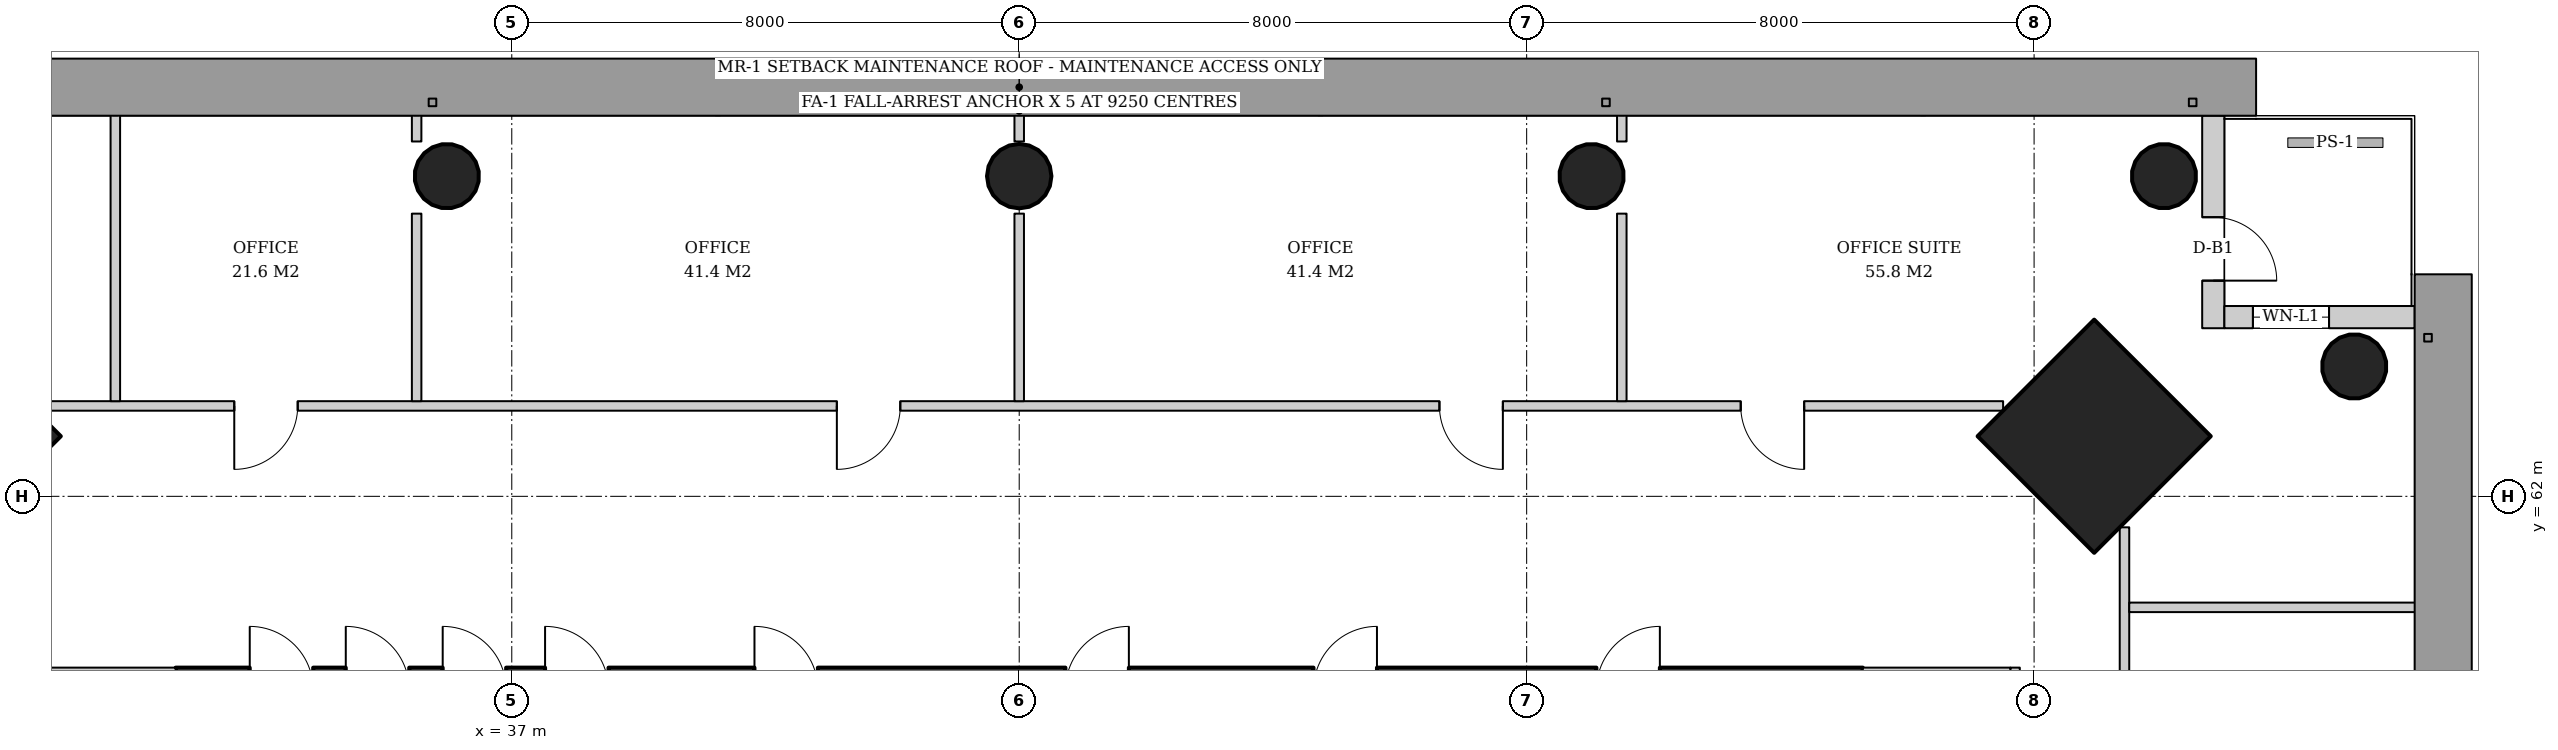
"""IFC4 building model, lengths in metres.
Left out: names, types, materials, properties, quantities, classifications, styles, units other than length and angle.
Written with IfcOpenShell. Run it as: python <this file> out.ifc"""

import sys

from ifc_helpers import new_model, si_unit, direction, frame, frame_2d, origin, origin_2d, place, context, subcontext, project, spatial, rectangle, hollow_circle, extrude, element, fill, save


model = new_model("IFC4")
c1 = context("Model", 3, precision=1e-05, world=origin(), true_north=direction((0.0, 1.0)))
c2 = subcontext(c1, "Body", "Model", "MODEL_VIEW")
j1 = project(units=[si_unit("LENGTHUNIT", "METRE"), si_unit("PLANEANGLEUNIT", "RADIAN")], contexts=[c1])
p1 = place(None, origin())
s1 = spatial("IfcSite", under=j1, at=p1, CompositionType="ELEMENT")
p2 = place(p1, origin())
s2 = spatial("IfcBuilding", under=s1, at=p2, CompositionType="ELEMENT")
p3 = place(p2, frame((0.0, 0.0, 112.2)))
s3 = spatial("IfcBuildingStorey", under=s2, at=p3, CompositionType="ELEMENT", Elevation=112.2)
p4 = place(p3, frame((61.986, 62.986, 0.0), z_axis=(-0.031898107953, -0.031898107953, 0.998981992539), x_axis=(0.707106781187, -0.707106781187, 0.0)))
e1 = element("IfcColumn", 1, at=p4, inside=s3, PredefinedType="COLUMN", context=c2, shape_type="SweptSolid", body=[
    extrude(rectangle(XDim=2.6, YDim=2.6, at=origin_2d()), origin(), (0.0, 0.0, 1.0), 3.804),
])
p5 = place(p3, frame((66.086, 64.086, 0.0), z_axis=(-0.031898107953, -0.031898107953, 0.998981992539), x_axis=(0.707106781187, -0.707106781187, 0.0)))
e2 = element("IfcColumn", 2, at=p5, inside=s3, PredefinedType="COLUMN", context=c2, shape_type="SweptSolid", body=[
    extrude(hollow_circle(Radius=0.508, WallThickness=0.04, at=origin_2d()), origin(), (0.0, 0.0, 1.0), 3.804),
])
p6 = place(p3, frame((28.014, 62.986, 0.0), z_axis=(0.031898107953, -0.031898107953, 0.998981992539), x_axis=(0.707106781187, 0.707106781187, 0.0)))
e3 = element("IfcColumn", 3, at=p6, inside=s3, PredefinedType="COLUMN", context=c2, shape_type="SweptSolid", body=[
    extrude(rectangle(XDim=2.6, YDim=2.6, at=origin_2d()), origin(), (0.0, 0.0, 1.0), 3.804),
])
p7 = place(p3, frame((63.086, 67.086, 0.0), z_axis=(-0.031898107953, -0.031898107953, 0.998981992539), x_axis=(0.707106781187, -0.707106781187, 0.0)))
e4 = element("IfcColumn", 4, at=p7, inside=s3, PredefinedType="COLUMN", context=c2, shape_type="SweptSolid", body=[
    extrude(hollow_circle(Radius=0.508, WallThickness=0.04, at=origin_2d()), origin(), (0.0, 0.0, 1.0), 3.804),
])
p8 = place(p3, frame((54.043, 67.086, 0.0), z_axis=(-0.015987237665, -0.031910269556, 0.999362868496), x_axis=(0.894067115991, -0.447933021895, 0.0)))
e5 = element("IfcColumn", 5, at=p8, inside=s3, PredefinedType="COLUMN", context=c2, shape_type="SweptSolid", body=[
    extrude(hollow_circle(Radius=0.508, WallThickness=0.04, at=origin_2d()), origin(), (0.0, 0.0, 1.0), 3.802),
])
p9 = place(p3, frame((45.0, 67.086, 0.0), z_axis=(0.0, -0.031914348339, 0.999490607445), x_axis=(1.0, 0.0, 0.0)))
e6 = element("IfcColumn", 6, at=p9, inside=s3, PredefinedType="COLUMN", context=c2, shape_type="SweptSolid", body=[
    extrude(hollow_circle(Radius=0.508, WallThickness=0.04, at=origin_2d()), origin(), (0.0, 0.0, 1.0), 3.802),
])
p10 = place(p3, frame((35.957, 67.086, 0.0), z_axis=(0.015987237665, -0.031910269556, 0.999362868496), x_axis=(0.894067115991, 0.447933021895, 0.0)))
e7 = element("IfcColumn", 7, at=p10, inside=s3, PredefinedType="COLUMN", context=c2, shape_type="SweptSolid", body=[
    extrude(hollow_circle(Radius=0.508, WallThickness=0.04, at=origin_2d()), origin(), (0.0, 0.0, 1.0), 3.802),
])
p11 = place(p3, frame((31.7, 58.95, 0.0), z_axis=(0.0, 0.0, 1.0), x_axis=(1.0, 0.0, 0.0)))
e8 = element("IfcWall", 8, at=p11, inside=s3, PredefinedType="SHEAR", context=c2, shape_type="SweptSolid", body=[
    extrude(rectangle(XDim=26.6, YDim=0.7, at=frame_2d((13.3, 0.0))), origin(), (0.0, 0.0, 1.0), 3.8),
])
p12 = place(p11, frame((17.94, 0.0, 0.0)))
e9 = element("IfcOpeningElement", 9, at=p12, cuts=e8, PredefinedType="OPENING", context=c2, shape_type="SweptSolid", body=[
    extrude(rectangle(XDim=1.0, YDim=2.1, at=frame_2d((0.5, 1.05))), frame((0.0, 0.36, 0.0), z_axis=(0.0, -1.0, 0.0), x_axis=(1.0, 0.0, 0.0)), (0.0, 0.0, 1.0), 0.72),
])
p13 = place(p11, frame((5.825, 0.0, 0.0)))
e10 = element("IfcOpeningElement", 10, at=p13, cuts=e8, PredefinedType="OPENING", context=c2, shape_type="SweptSolid", body=[
    extrude(rectangle(XDim=1.0, YDim=2.1, at=frame_2d((0.5, 1.05))), frame((0.0, 0.36, 0.0), z_axis=(0.0, -1.0, 0.0), x_axis=(1.0, 0.0, 0.0)), (0.0, 0.0, 1.0), 0.72),
])
p14 = place(p11, frame((1.169, 0.0, 0.0)))
e11 = element("IfcOpeningElement", 11, at=p14, cuts=e8, PredefinedType="OPENING", context=c2, shape_type="SweptSolid", body=[
    extrude(rectangle(XDim=1.0, YDim=2.1, at=frame_2d((0.5, 1.05))), frame((0.0, 0.36, 0.0), z_axis=(0.0, -1.0, 0.0), x_axis=(1.0, 0.0, 0.0)), (0.0, 0.0, 1.0), 0.72),
])
p15 = place(p11, frame((2.683, 0.0, 0.0)))
e12 = element("IfcOpeningElement", 12, at=p15, cuts=e8, PredefinedType="OPENING", context=c2, shape_type="SweptSolid", body=[
    extrude(rectangle(XDim=1.0, YDim=2.1, at=frame_2d((0.5, 1.05))), frame((0.0, 0.36, 0.0), z_axis=(0.0, -1.0, 0.0), x_axis=(1.0, 0.0, 0.0)), (0.0, 0.0, 1.0), 0.72),
])
p16 = place(p11, frame((4.211, 0.0, 0.0)))
e13 = element("IfcOpeningElement", 13, at=p16, cuts=e8, PredefinedType="OPENING", context=c2, shape_type="SweptSolid", body=[
    extrude(rectangle(XDim=1.0, YDim=2.1, at=frame_2d((0.5, 1.05))), frame((0.0, 0.36, 0.0), z_axis=(0.0, -1.0, 0.0), x_axis=(1.0, 0.0, 0.0)), (0.0, 0.0, 1.0), 0.72),
])
p17 = place(p11, frame((9.126, 0.0, 0.0)))
e14 = element("IfcOpeningElement", 14, at=p17, cuts=e8, PredefinedType="OPENING", context=c2, shape_type="SweptSolid", body=[
    extrude(rectangle(XDim=1.0, YDim=2.1, at=frame_2d((0.5, 1.05))), frame((0.0, 0.36, 0.0), z_axis=(0.0, -1.0, 0.0), x_axis=(1.0, 0.0, 0.0)), (0.0, 0.0, 1.0), 0.72),
])
p18 = place(p11, frame((14.029, 0.0, 0.0)))
e15 = element("IfcOpeningElement", 15, at=p18, cuts=e8, PredefinedType="OPENING", context=c2, shape_type="SweptSolid", body=[
    extrude(rectangle(XDim=1.0, YDim=2.1, at=frame_2d((0.5, 1.05))), frame((0.0, 0.36, 0.0), z_axis=(0.0, -1.0, 0.0), x_axis=(1.0, 0.0, 0.0)), (0.0, 0.0, 1.0), 0.72),
])
p19 = place(p11, frame((22.4, 0.0, 0.0)))
e16 = element("IfcOpeningElement", 16, at=p19, cuts=e8, PredefinedType="OPENING", context=c2, shape_type="SweptSolid", body=[
    extrude(rectangle(XDim=1.0, YDim=2.1, at=frame_2d((0.5, 1.05))), frame((0.0, 0.36, 0.0), z_axis=(0.0, -1.0, 0.0), x_axis=(1.0, 0.0, 0.0)), (0.0, 0.0, 1.0), 0.72),
])
p20 = place(p3, frame((63.825, 68.0, 0.0), z_axis=(0.0, 0.0, 1.0), x_axis=(0.0, -1.0, 0.0)))
e17 = element("IfcWall", 17, at=p20, inside=s3, PredefinedType="SOLIDWALL", context=c2, shape_type="SweptSolid", body=[
    extrude(rectangle(XDim=3.35, YDim=0.35, at=frame_2d((1.675, 0.0))), origin(), (0.0, 0.0, 1.0), 3.62),
])
p21 = place(p20, frame((1.6, 0.0, 0.0)))
e18 = element("IfcOpeningElement", 18, at=p21, cuts=e17, PredefinedType="OPENING", context=c2, shape_type="SweptSolid", body=[
    extrude(rectangle(XDim=1.0, YDim=2.4, at=frame_2d((0.5, 1.2))), frame((0.0, 0.185, 0.0), z_axis=(0.0, -1.0, 0.0), x_axis=(1.0, 0.0, 0.0)), (0.0, 0.0, 1.0), 0.37),
])
p22 = place(p3, frame((64.0, 64.825, 0.0), z_axis=(0.0, 0.0, 1.0), x_axis=(1.0, 0.0, 0.0)))
e19 = element("IfcWall", 19, at=p22, inside=s3, PredefinedType="SOLIDWALL", context=c2, shape_type="SweptSolid", body=[
    extrude(rectangle(XDim=3.0, YDim=0.35, at=frame_2d((1.5, 0.0))), origin(), (0.0, 0.0, 1.0), 3.62),
])
p23 = place(p22, frame((0.45, 0.0, 0.6)))
e20 = element("IfcOpeningElement", 20, at=p23, cuts=e19, PredefinedType="OPENING", context=c2, shape_type="SweptSolid", body=[
    extrude(rectangle(XDim=1.2, YDim=2.55, at=frame_2d((0.6, 1.275))), frame((0.0, 0.185, 0.0), z_axis=(0.0, -1.0, 0.0), x_axis=(1.0, 0.0, 0.0)), (0.0, 0.0, 1.0), 0.37),
])
p24 = place(p3, frame((60.7, 48.025, 0.0), z_axis=(0.0, 0.0, 1.0), x_axis=(0.0, 1.0, 0.0)))
e21 = element("IfcWall", 21, at=p24, inside=s3, PredefinedType="PARTITIONING", context=c2, shape_type="SweptSolid", body=[
    extrude(rectangle(XDim=11.275, YDim=0.15, at=frame_2d((5.638, 0.0))), origin(), (0.0, 0.0, 1.0), 2.806),
])
p25 = place(p24, frame((5.137, 0.0, 0.0)))
e22 = element("IfcOpeningElement", 22, at=p25, cuts=e21, PredefinedType="OPENING", context=c2, shape_type="SweptSolid", body=[
    extrude(rectangle(XDim=1.0, YDim=2.1, at=frame_2d((0.5, 1.05))), frame((0.0, 0.085, 0.0), z_axis=(0.0, -1.0, 0.0), x_axis=(1.0, 0.0, 0.0)), (0.0, 0.0, 1.0), 0.17),
])
for number, where, z_axis, x_axis in (
    (23, (58.3, 59.225, 0.0), (0.0, 0.0, 1.0), (1.0, 0.0, 0.0)),
    (24, (31.7, 59.225, 0.0), (0.0, 0.0, 1.0), (-1.0, 0.0, 0.0)),
):
    element("IfcWall", number, at=place(p3, frame(where, z_axis=z_axis, x_axis=x_axis)), inside=s3, PredefinedType="PARTITIONING", context=c2, shape_type="SweptSolid", body=[
        extrude(rectangle(XDim=2.325, YDim=0.15, at=frame_2d((1.163, 0.0))), origin(), (0.0, 0.0, 1.0), 3.62),
    ])
p26 = place(p3, frame((62.425, 30.489, 0.0), z_axis=(0.0, 0.0, 1.0), x_axis=(0.0, 1.0, 0.0)))
e25 = element("IfcWall", 25, at=p26, inside=s3, PredefinedType="PARTITIONING", context=c2, shape_type="SweptSolid", body=[
    extrude(rectangle(XDim=31.023, YDim=0.15, at=frame_2d((15.511, 0.0))), origin(), (0.0, 0.0, 1.0), 2.72),
])
p27 = place(p26, frame((3.136, 0.0, 0.0)))
e26 = element("IfcOpeningElement", 26, at=p27, cuts=e25, PredefinedType="OPENING", context=c2, shape_type="SweptSolid", body=[
    extrude(rectangle(XDim=1.0, YDim=2.1, at=frame_2d((0.5, 1.05))), frame((0.0, 0.085, 0.0), z_axis=(0.0, -1.0, 0.0), x_axis=(1.0, 0.0, 0.0)), (0.0, 0.0, 1.0), 0.17),
])
p28 = place(p26, frame((7.886, 0.0, 0.0)))
e27 = element("IfcOpeningElement", 27, at=p28, cuts=e25, PredefinedType="OPENING", context=c2, shape_type="SweptSolid", body=[
    extrude(rectangle(XDim=1.0, YDim=2.1, at=frame_2d((0.5, 1.05))), frame((0.0, 0.085, 0.0), z_axis=(0.0, -1.0, 0.0), x_axis=(1.0, 0.0, 0.0)), (0.0, 0.0, 1.0), 0.17),
])
p29 = place(p26, frame((12.636, 0.0, 0.0)))
e28 = element("IfcOpeningElement", 28, at=p29, cuts=e25, PredefinedType="OPENING", context=c2, shape_type="SweptSolid", body=[
    extrude(rectangle(XDim=1.0, YDim=2.1, at=frame_2d((0.5, 1.05))), frame((0.0, 0.085, 0.0), z_axis=(0.0, -1.0, 0.0), x_axis=(1.0, 0.0, 0.0)), (0.0, 0.0, 1.0), 0.17),
])
p30 = place(p26, frame((17.386, 0.0, 0.0)))
e29 = element("IfcOpeningElement", 29, at=p30, cuts=e25, PredefinedType="OPENING", context=c2, shape_type="SweptSolid", body=[
    extrude(rectangle(XDim=1.0, YDim=2.1, at=frame_2d((0.5, 1.05))), frame((0.0, 0.085, 0.0), z_axis=(0.0, -1.0, 0.0), x_axis=(1.0, 0.0, 0.0)), (0.0, 0.0, 1.0), 0.17),
])
p31 = place(p26, frame((22.136, 0.0, 0.0)))
e30 = element("IfcOpeningElement", 30, at=p31, cuts=e25, PredefinedType="OPENING", context=c2, shape_type="SweptSolid", body=[
    extrude(rectangle(XDim=1.0, YDim=2.1, at=frame_2d((0.5, 1.05))), frame((0.0, 0.085, 0.0), z_axis=(0.0, -1.0, 0.0), x_axis=(1.0, 0.0, 0.0)), (0.0, 0.0, 1.0), 0.17),
])
p32 = place(p3, frame((62.5, 60.25, 0.0), z_axis=(0.0, 0.0, 1.0), x_axis=(1.0, 0.0, 0.0)))
e31 = element("IfcWall", 31, at=p32, inside=s3, PredefinedType="PARTITIONING", context=c2, shape_type="SweptSolid", body=[
    extrude(rectangle(XDim=4.54, YDim=0.15, at=frame_2d((2.27, 0.0))), origin(), (0.0, 0.0, 1.0), 2.82),
])
p33 = place(p3, frame((60.511, 63.425, 0.0), z_axis=(0.0, 0.0, 1.0), x_axis=(-1.0, 0.0, 0.0)))
e32 = element("IfcWall", 32, at=p33, inside=s3, PredefinedType="PARTITIONING", context=c2, shape_type="SweptSolid", body=[
    extrude(rectangle(XDim=31.023, YDim=0.15, at=frame_2d((15.511, 0.0))), origin(), (0.0, 0.0, 1.0), 2.72),
])
p34 = place(p33, frame((3.136, 0.0, 0.0)))
e33 = element("IfcOpeningElement", 33, at=p34, cuts=e32, PredefinedType="OPENING", context=c2, shape_type="SweptSolid", body=[
    extrude(rectangle(XDim=1.0, YDim=2.1, at=frame_2d((0.5, 1.05))), frame((0.0, 0.085, 0.0), z_axis=(0.0, -1.0, 0.0), x_axis=(1.0, 0.0, 0.0)), (0.0, 0.0, 1.0), 0.17),
])
p35 = place(p33, frame((7.886, 0.0, 0.0)))
e34 = element("IfcOpeningElement", 34, at=p35, cuts=e32, PredefinedType="OPENING", context=c2, shape_type="SweptSolid", body=[
    extrude(rectangle(XDim=1.0, YDim=2.1, at=frame_2d((0.5, 1.05))), frame((0.0, 0.085, 0.0), z_axis=(0.0, -1.0, 0.0), x_axis=(1.0, 0.0, 0.0)), (0.0, 0.0, 1.0), 0.17),
])
p36 = place(p33, frame((17.386, 0.0, 0.0)))
e35 = element("IfcOpeningElement", 35, at=p36, cuts=e32, PredefinedType="OPENING", context=c2, shape_type="SweptSolid", body=[
    extrude(rectangle(XDim=1.0, YDim=2.1, at=frame_2d((0.5, 1.05))), frame((0.0, 0.085, 0.0), z_axis=(0.0, -1.0, 0.0), x_axis=(1.0, 0.0, 0.0)), (0.0, 0.0, 1.0), 0.17),
])
p37 = place(p33, frame((26.886, 0.0, 0.0)))
e36 = element("IfcOpeningElement", 36, at=p37, cuts=e32, PredefinedType="OPENING", context=c2, shape_type="SweptSolid", body=[
    extrude(rectangle(XDim=1.0, YDim=2.1, at=frame_2d((0.5, 1.05))), frame((0.0, 0.085, 0.0), z_axis=(0.0, -1.0, 0.0), x_axis=(1.0, 0.0, 0.0)), (0.0, 0.0, 1.0), 0.17),
])
p38 = place(p3, frame((54.5, 63.5, 0.0), z_axis=(0.0, 0.0, 1.0), x_axis=(0.0, 1.0, 0.0)))
e37 = element("IfcWall", 37, at=p38, inside=s3, PredefinedType="PARTITIONING", context=c2, shape_type="SweptSolid", body=[
    extrude(rectangle(XDim=2.956, YDim=0.15, at=frame_2d((1.478, 0.0))), origin(), (0.0, 0.0, 1.0), 3.62),
])
p39 = place(p3, frame((54.5, 67.594, 0.0), z_axis=(0.0, 0.0, 1.0), x_axis=(0.0, 1.0, 0.0)))
e38 = element("IfcWall", 38, at=p39, inside=s3, PredefinedType="PARTITIONING", context=c2, shape_type="SweptSolid", body=[
    extrude(rectangle(XDim=0.446, YDim=0.15, at=frame_2d((0.223, 0.0))), origin(), (0.0, 0.0, 1.0), 3.62),
])
p40 = place(p3, frame((45.0, 63.5, 0.0), z_axis=(0.0, 0.0, 1.0), x_axis=(0.0, 1.0, 0.0)))
e39 = element("IfcWall", 39, at=p40, inside=s3, PredefinedType="PARTITIONING", context=c2, shape_type="SweptSolid", body=[
    extrude(rectangle(XDim=2.956, YDim=0.15, at=frame_2d((1.478, 0.0))), origin(), (0.0, 0.0, 1.0), 3.62),
])
p41 = place(p3, frame((45.0, 67.594, 0.0), z_axis=(0.0, 0.0, 1.0), x_axis=(0.0, 1.0, 0.0)))
e40 = element("IfcWall", 40, at=p41, inside=s3, PredefinedType="PARTITIONING", context=c2, shape_type="SweptSolid", body=[
    extrude(rectangle(XDim=0.446, YDim=0.15, at=frame_2d((0.223, 0.0))), origin(), (0.0, 0.0, 1.0), 3.62),
])
p42 = place(p3, frame((35.5, 63.5, 0.0), z_axis=(0.0, 0.0, 1.0), x_axis=(0.0, 1.0, 0.0)))
e41 = element("IfcWall", 41, at=p42, inside=s3, PredefinedType="PARTITIONING", context=c2, shape_type="SweptSolid", body=[
    extrude(rectangle(XDim=2.956, YDim=0.15, at=frame_2d((1.478, 0.0))), origin(), (0.0, 0.0, 1.0), 3.62),
])
p43 = place(p3, frame((35.5, 67.594, 0.0), z_axis=(0.0, 0.0, 1.0), x_axis=(0.0, 1.0, 0.0)))
e42 = element("IfcWall", 42, at=p43, inside=s3, PredefinedType="PARTITIONING", context=c2, shape_type="SweptSolid", body=[
    extrude(rectangle(XDim=0.446, YDim=0.15, at=frame_2d((0.223, 0.0))), origin(), (0.0, 0.0, 1.0), 3.62),
])
p44 = place(p3, frame((30.75, 63.5, 0.0), z_axis=(0.0, 0.0, 1.0), x_axis=(0.0, 1.0, 0.0)))
e43 = element("IfcWall", 43, at=p44, inside=s3, PredefinedType="PARTITIONING", context=c2, shape_type="SweptSolid", body=[
    extrude(rectangle(XDim=4.54, YDim=0.15, at=frame_2d((2.27, 0.0))), origin(), (0.0, 0.0, 1.0), 2.82),
])
p45 = place(p21, origin())
e44 = element("IfcDoor", 44, at=p45, inside=s3, OperationType="SINGLE_SWING_RIGHT", PredefinedType="DOOR", context=c2, shape_type="SweptSolid", body=[
    extrude(rectangle(XDim=1.0, YDim=2.4, at=frame_2d((0.5, 1.2))), frame((0.0, 0.025, 0.0), z_axis=(0.0, -1.0, 0.0), x_axis=(1.0, 0.0, 0.0)), (0.0, 0.0, 1.0), 0.05),
])
fill(e18, e44)
p46 = place(p23, origin())
e45 = element("IfcWindow", 45, at=p46, inside=s3, PartitioningType="SINGLE_PANEL", PredefinedType="WINDOW", context=c2, shape_type="SweptSolid", body=[
    extrude(rectangle(XDim=1.2, YDim=2.55, at=frame_2d((0.6, 1.275))), frame((0.0, 0.03, 0.0), z_axis=(0.0, -1.0, 0.0), x_axis=(1.0, 0.0, 0.0)), (0.0, 0.0, 1.0), 0.06),
])
fill(e20, e45)
p47 = place(p34, origin())
e46 = element("IfcDoor", 46, at=p47, inside=s3, OperationType="SINGLE_SWING_LEFT", PredefinedType="DOOR", context=c2, shape_type="SweptSolid", body=[
    extrude(rectangle(XDim=1.0, YDim=2.1, at=frame_2d((0.5, 1.05))), frame((0.0, 0.025, 0.0), z_axis=(0.0, -1.0, 0.0), x_axis=(1.0, 0.0, 0.0)), (0.0, 0.0, 1.0), 0.05),
])
fill(e33, e46)
p48 = place(p35, origin())
e47 = element("IfcDoor", 47, at=p48, inside=s3, OperationType="SINGLE_SWING_LEFT", PredefinedType="DOOR", context=c2, shape_type="SweptSolid", body=[
    extrude(rectangle(XDim=1.0, YDim=2.1, at=frame_2d((0.5, 1.05))), frame((0.0, 0.025, 0.0), z_axis=(0.0, -1.0, 0.0), x_axis=(1.0, 0.0, 0.0)), (0.0, 0.0, 1.0), 0.05),
])
fill(e34, e47)
p49 = place(p36, origin())
e48 = element("IfcDoor", 48, at=p49, inside=s3, OperationType="SINGLE_SWING_RIGHT", PredefinedType="DOOR", context=c2, shape_type="SweptSolid", body=[
    extrude(rectangle(XDim=1.0, YDim=2.1, at=frame_2d((0.5, 1.05))), frame((0.0, 0.025, 0.0), z_axis=(0.0, -1.0, 0.0), x_axis=(1.0, 0.0, 0.0)), (0.0, 0.0, 1.0), 0.05),
])
fill(e35, e48)
p50 = place(p37, origin())
e49 = element("IfcDoor", 49, at=p50, inside=s3, OperationType="SINGLE_SWING_RIGHT", PredefinedType="DOOR", context=c2, shape_type="SweptSolid", body=[
    extrude(rectangle(XDim=1.0, YDim=2.1, at=frame_2d((0.5, 1.05))), frame((0.0, 0.025, 0.0), z_axis=(0.0, -1.0, 0.0), x_axis=(1.0, 0.0, 0.0)), (0.0, 0.0, 1.0), 0.05),
])
fill(e36, e49)
save(model, sys.argv[1])
